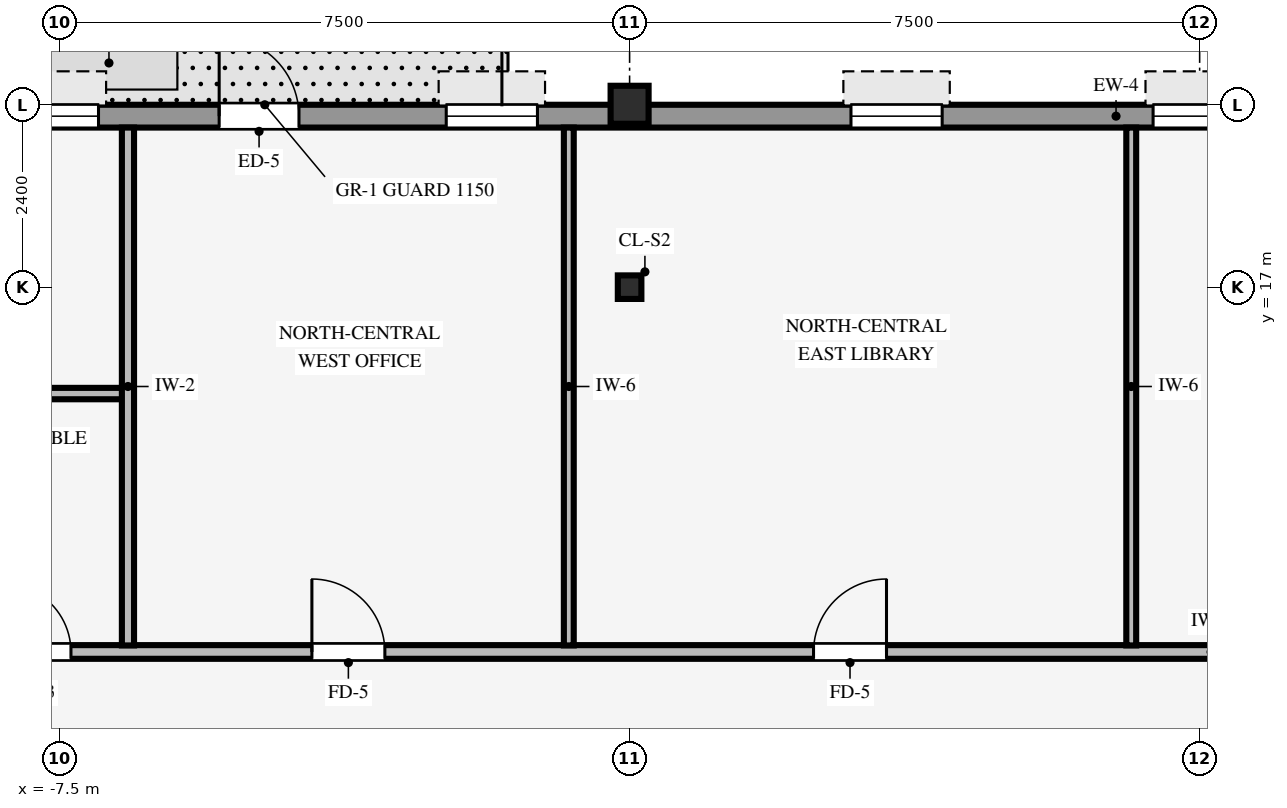
"""IFC4 building model, lengths in metres.
Left out: names, types, materials, properties, quantities, classifications, styles, units other than length and angle.
Written with IfcOpenShell. Run it as: python <this file> out.ifc"""

import sys

from ifc_helpers import new_model, si_unit, direction, frame, frame_2d, origin, origin_2d, place, context, subcontext, project, spatial, rectangle, hollow_rectangle, i_section, extrude, source, transform, mapped, element, fill, save


model = new_model("IFC4")
c1 = context("Model", 3, precision=1e-05, world=origin(), true_north=direction((0.0, 1.0)))
c2 = subcontext(c1, "Body", "Model", "MODEL_VIEW")
j1 = project(units=[si_unit("LENGTHUNIT", "METRE"), si_unit("PLANEANGLEUNIT", "RADIAN")], contexts=[c1])
p1 = place(None, origin())
s1 = spatial("IfcSite", under=j1, at=p1, CompositionType="ELEMENT")
p2 = place(p1, origin())
s2 = spatial("IfcBuilding", under=s1, at=p2, CompositionType="ELEMENT")
p3 = place(p2, frame((0.0, 0.0, 238.35)))
s3 = spatial("IfcBuildingStorey", under=s2, at=p3, CompositionType="ELEMENT", Elevation=238.35)
p4 = place(p3, frame((0.0, 19.4, 0.0), z_axis=(0.0, 0.0, 1.0), x_axis=(1.0, 0.0, 0.0)))
e1 = element("IfcColumn", 1, at=p4, inside=s3, PredefinedType="COLUMN", context=c2, shape_type="SweptSolid", body=[
    extrude(hollow_rectangle(XDim=0.5, YDim=0.5, WallThickness=0.032, InnerFilletRadius=0.032, OuterFilletRadius=0.064, at=origin_2d()), origin(), (0.0, 0.0, 1.0), 3.37),
])
p5 = place(p3, frame((0.0, 17.0, 0.0), z_axis=(0.0, 0.0, 1.0), x_axis=(1.0, 0.0, 0.0)))
e2 = element("IfcColumn", 2, at=p5, inside=s3, PredefinedType="COLUMN", context=c2, shape_type="SweptSolid", body=[
    extrude(i_section(OverallWidth=0.31, OverallDepth=0.31, WebThickness=0.015, FlangeThickness=0.015, FilletRadius=0.015, at=origin_2d()), origin(), (0.0, 0.0, 1.0), 3.37),
])
p6 = place(p3, frame((-24.3, 19.25, 0.0), z_axis=(0.0, 0.0, 1.0), x_axis=(1.0, 0.0, 0.0)))
e3 = element("IfcWall", 3, at=p6, inside=s3, PredefinedType="STANDARD", context=c2, shape_type="SweptSolid", body=[
    extrude(rectangle(XDim=41.0, YDim=0.3, at=frame_2d((20.5, 0.0))), origin(), (0.0, 0.0, 1.0), 2.705),
])
p7 = place(p6, frame((18.9, 0.0, 0.0)))
e4 = element("IfcOpeningElement", 4, at=p7, cuts=e3, PredefinedType="OPENING", context=c2, shape_type="SweptSolid", body=[
    extrude(rectangle(XDim=1.05, YDim=2.1, at=frame_2d((0.525, 1.05))), frame((0.0, 0.16, 0.0), z_axis=(0.0, -1.0, 0.0), x_axis=(1.0, 0.0, 0.0)), (0.0, 0.0, 1.0), 0.32),
])
p8 = place(p6, frame((2.837, 0.0, 0.8)))
e5 = element("IfcOpeningElement", 5, at=p8, cuts=e3, PredefinedType="OPENING", context=c2, shape_type="SweptSolid", body=[
    extrude(rectangle(XDim=1.2, YDim=1.48, at=frame_2d((0.6, 0.74))), frame((0.0, 0.16, 0.0), z_axis=(0.0, -1.0, 0.0), x_axis=(1.0, 0.0, 0.0)), (0.0, 0.0, 1.0), 0.32),
])
p9 = place(p6, frame((7.712, 0.0, 0.8)))
e6 = element("IfcOpeningElement", 6, at=p9, cuts=e3, PredefinedType="OPENING", context=c2, shape_type="SweptSolid", body=[
    extrude(rectangle(XDim=1.2, YDim=1.48, at=frame_2d((0.6, 0.74))), frame((0.0, 0.16, 0.0), z_axis=(0.0, -1.0, 0.0), x_axis=(1.0, 0.0, 0.0)), (0.0, 0.0, 1.0), 0.32),
])
p10 = place(p6, frame((12.587, 0.0, 0.8)))
e7 = element("IfcOpeningElement", 7, at=p10, cuts=e3, PredefinedType="OPENING", context=c2, shape_type="SweptSolid", body=[
    extrude(rectangle(XDim=1.2, YDim=1.48, at=frame_2d((0.6, 0.74))), frame((0.0, 0.16, 0.0), z_axis=(0.0, -1.0, 0.0), x_axis=(1.0, 0.0, 0.0)), (0.0, 0.0, 1.0), 0.32),
])
p11 = place(p6, frame((16.113, 0.0, 0.8)))
e8 = element("IfcOpeningElement", 8, at=p11, cuts=e3, PredefinedType="OPENING", context=c2, shape_type="SweptSolid", body=[
    extrude(rectangle(XDim=1.2, YDim=1.48, at=frame_2d((0.6, 0.74))), frame((0.0, 0.16, 0.0), z_axis=(0.0, -1.0, 0.0), x_axis=(1.0, 0.0, 0.0)), (0.0, 0.0, 1.0), 0.32),
])
p12 = place(p6, frame((21.887, 0.0, 0.8)))
e9 = element("IfcOpeningElement", 9, at=p12, cuts=e3, PredefinedType="OPENING", context=c2, shape_type="SweptSolid", body=[
    extrude(rectangle(XDim=1.2, YDim=1.48, at=frame_2d((0.6, 0.74))), frame((0.0, 0.16, 0.0), z_axis=(0.0, -1.0, 0.0), x_axis=(1.0, 0.0, 0.0)), (0.0, 0.0, 1.0), 0.32),
])
p13 = place(p6, frame((27.212, 0.0, 0.8)))
e10 = element("IfcOpeningElement", 10, at=p13, cuts=e3, PredefinedType="OPENING", context=c2, shape_type="SweptSolid", body=[
    extrude(rectangle(XDim=1.2, YDim=1.48, at=frame_2d((0.6, 0.74))), frame((0.0, 0.16, 0.0), z_axis=(0.0, -1.0, 0.0), x_axis=(1.0, 0.0, 0.0)), (0.0, 0.0, 1.0), 0.32),
])
p14 = place(p6, frame((31.188, 0.0, 0.8)))
e11 = element("IfcOpeningElement", 11, at=p14, cuts=e3, PredefinedType="OPENING", context=c2, shape_type="SweptSolid", body=[
    extrude(rectangle(XDim=1.2, YDim=1.48, at=frame_2d((0.6, 0.74))), frame((0.0, 0.16, 0.0), z_axis=(0.0, -1.0, 0.0), x_axis=(1.0, 0.0, 0.0)), (0.0, 0.0, 1.0), 0.32),
])
p15 = place(p6, frame((36.962, 0.0, 0.8)))
e12 = element("IfcOpeningElement", 12, at=p15, cuts=e3, PredefinedType="OPENING", context=c2, shape_type="SweptSolid", body=[
    extrude(rectangle(XDim=1.2, YDim=1.48, at=frame_2d((0.6, 0.74))), frame((0.0, 0.16, 0.0), z_axis=(0.0, -1.0, 0.0), x_axis=(1.0, 0.0, 0.0)), (0.0, 0.0, 1.0), 0.32),
])
p16 = place(p3, frame((-9.0, 12.2, 0.0), z_axis=(0.0, 0.0, 1.0), x_axis=(1.0, 0.0, 0.0)))
e13 = element("IfcWall", 13, at=p16, inside=s3, PredefinedType="PARTITIONING", context=c2, shape_type="SweptSolid", body=[
    extrude(rectangle(XDim=24.8, YDim=0.18, at=frame_2d((12.4, 0.0))), origin(), (0.0, 0.0, 1.0), 3.36),
])
p17 = place(p16, frame((11.42, 0.0, 0.0)))
e14 = element("IfcOpeningElement", 14, at=p17, cuts=e13, PredefinedType="OPENING", context=c2, shape_type="SweptSolid", body=[
    extrude(rectangle(XDim=0.96, YDim=2.1, at=frame_2d((0.48, 1.05))), frame((0.0, 0.1, 0.0), z_axis=(0.0, -1.0, 0.0), x_axis=(1.0, 0.0, 0.0)), (0.0, 0.0, 1.0), 0.2),
])
p18 = place(p16, frame((20.92, 0.0, 0.0)))
e15 = element("IfcOpeningElement", 15, at=p18, cuts=e13, PredefinedType="OPENING", context=c2, shape_type="SweptSolid", body=[
    extrude(rectangle(XDim=0.96, YDim=2.1, at=frame_2d((0.48, 1.05))), frame((0.0, 0.1, 0.0), z_axis=(0.0, -1.0, 0.0), x_axis=(1.0, 0.0, 0.0)), (0.0, 0.0, 1.0), 0.2),
])
p19 = place(p16, frame((4.82, 0.0, 0.0)))
e16 = element("IfcOpeningElement", 16, at=p19, cuts=e13, PredefinedType="OPENING", context=c2, shape_type="SweptSolid", body=[
    extrude(rectangle(XDim=0.96, YDim=2.1, at=frame_2d((0.48, 1.05))), frame((0.0, 0.1, 0.0), z_axis=(0.0, -1.0, 0.0), x_axis=(1.0, 0.0, 0.0)), (0.0, 0.0, 1.0), 0.2),
])
p20 = place(p16, frame((0.75, 0.0, 0.0)))
e17 = element("IfcOpeningElement", 17, at=p20, cuts=e13, PredefinedType="OPENING", context=c2, shape_type="SweptSolid", body=[
    extrude(rectangle(XDim=0.9, YDim=2.1, at=frame_2d((0.45, 1.05))), frame((0.0, 0.1, 0.0), z_axis=(0.0, -1.0, 0.0), x_axis=(1.0, 0.0, 0.0)), (0.0, 0.0, 1.0), 0.2),
])
p21 = place(p3, frame((-14.8, 15.6, 0.0), z_axis=(0.0, 0.0, 1.0), x_axis=(1.0, 0.0, 0.0)))
e18 = element("IfcWall", 18, at=p21, inside=s3, PredefinedType="PARTITIONING", context=c2, shape_type="SweptSolid", body=[
    extrude(rectangle(XDim=8.129, YDim=0.15, at=frame_2d((4.064, 0.0))), origin(), (0.0, 0.0, 1.0), 3.36),
])
p22 = place(p3, frame((-6.6, 12.286, 0.0), z_axis=(0.0, 0.0, 1.0), x_axis=(0.0, 1.0, 0.0)))
e19 = element("IfcWall", 19, at=p22, inside=s3, PredefinedType="PARTITIONING", context=c2, shape_type="SweptSolid", body=[
    extrude(rectangle(XDim=6.814, YDim=0.16, at=frame_2d((3.407, 0.0))), origin(), (0.0, 0.0, 1.0), 3.36),
])
for number, where, z_axis, x_axis in (
    (20, (-0.8, 12.286, 0.0), (0.0, 0.0, 1.0), (0.0, 1.0, 0.0)),
    (21, (6.6, 12.286, 0.0), (0.0, 0.0, 1.0), (0.0, 1.0, 0.0)),
):
    element("IfcWall", number, at=place(p3, frame(where, z_axis=z_axis, x_axis=x_axis)), inside=s3, PredefinedType="PARTITIONING", context=c2, shape_type="SweptSolid", body=[
        extrude(rectangle(XDim=6.814, YDim=0.13, at=frame_2d((3.407, 0.0))), origin(), (0.0, 0.0, 1.0), 3.36),
    ])
m1 = source(origin(), c2, "Body", "SweptSolid", [
    extrude(rectangle(XDim=1.05, YDim=2.1, at=frame_2d((0.525, 1.05))), frame((0.0, 0.025, 0.0), z_axis=(0.0, -1.0, 0.0), x_axis=(1.0, 0.0, 0.0)), (0.0, 0.0, 1.0), 0.05),
])
p23 = place(p7, origin())
e22 = element("IfcDoor", 22, at=p23, inside=s3, OperationType="SINGLE_SWING_LEFT", PredefinedType="DOOR", context=c2, shape_type="MappedRepresentation", body=[
    mapped(m1, transform((0.0, 0.0, 0.0), scale=1.0)),
])
fill(e4, e22)
m2 = source(origin(), c2, "Body", "SweptSolid", [
    extrude(rectangle(XDim=1.2, YDim=1.48, at=frame_2d((0.6, 0.74))), frame((0.0, 0.03, 0.0), z_axis=(0.0, -1.0, 0.0), x_axis=(1.0, 0.0, 0.0)), (0.0, 0.0, 1.0), 0.06),
])
p24 = place(p11, origin())
e23 = element("IfcWindow", 23, at=p24, inside=s3, PartitioningType="SINGLE_PANEL", PredefinedType="WINDOW", context=c2, shape_type="MappedRepresentation", body=[
    mapped(m2, transform((0.0, 0.0, 0.0), scale=1.0)),
])
fill(e8, e23)
p25 = place(p12, origin())
e24 = element("IfcWindow", 24, at=p25, inside=s3, PartitioningType="SINGLE_PANEL", PredefinedType="WINDOW", context=c2, shape_type="MappedRepresentation", body=[
    mapped(m2, transform((0.0, 0.0, 0.0), scale=1.0)),
])
fill(e9, e24)
p26 = place(p13, origin())
e25 = element("IfcWindow", 25, at=p26, inside=s3, PartitioningType="SINGLE_PANEL", PredefinedType="WINDOW", context=c2, shape_type="MappedRepresentation", body=[
    mapped(m2, transform((0.0, 0.0, 0.0), scale=1.0)),
])
fill(e10, e25)
p27 = place(p14, origin())
e26 = element("IfcWindow", 26, at=p27, inside=s3, PartitioningType="SINGLE_PANEL", PredefinedType="WINDOW", context=c2, shape_type="MappedRepresentation", body=[
    mapped(m2, transform((0.0, 0.0, 0.0), scale=1.0)),
])
fill(e11, e26)
m3 = source(origin(), c2, "Body", "SweptSolid", [
    extrude(rectangle(XDim=0.96, YDim=2.1, at=frame_2d((0.48, 1.05))), frame((0.0, 0.025, 0.0), z_axis=(0.0, -1.0, 0.0), x_axis=(1.0, 0.0, 0.0)), (0.0, 0.0, 1.0), 0.05),
])
p28 = place(p17, origin())
e27 = element("IfcDoor", 27, at=p28, inside=s3, OperationType="SINGLE_SWING_RIGHT", PredefinedType="DOOR", context=c2, shape_type="MappedRepresentation", body=[
    mapped(m3, transform((0.0, 0.0, 0.0), scale=1.0)),
])
fill(e14, e27)
p29 = place(p19, origin())
e28 = element("IfcDoor", 28, at=p29, inside=s3, OperationType="SINGLE_SWING_LEFT", PredefinedType="DOOR", context=c2, shape_type="MappedRepresentation", body=[
    mapped(m3, transform((0.0, 0.0, 0.0), scale=1.0)),
])
fill(e16, e28)
m4 = source(origin(), c2, "Body", "SweptSolid", [
    extrude(rectangle(XDim=0.9, YDim=2.1, at=frame_2d((0.45, 1.05))), frame((0.0, 0.025, 0.0), z_axis=(0.0, -1.0, 0.0), x_axis=(1.0, 0.0, 0.0)), (0.0, 0.0, 1.0), 0.05),
])
p30 = place(p20, origin())
e29 = element("IfcDoor", 29, at=p30, inside=s3, OperationType="SINGLE_SWING_LEFT", PredefinedType="DOOR", context=c2, shape_type="MappedRepresentation", body=[
    mapped(m4, transform((0.0, 0.0, 0.0), scale=1.0)),
])
fill(e17, e29)
save(model, sys.argv[1])
